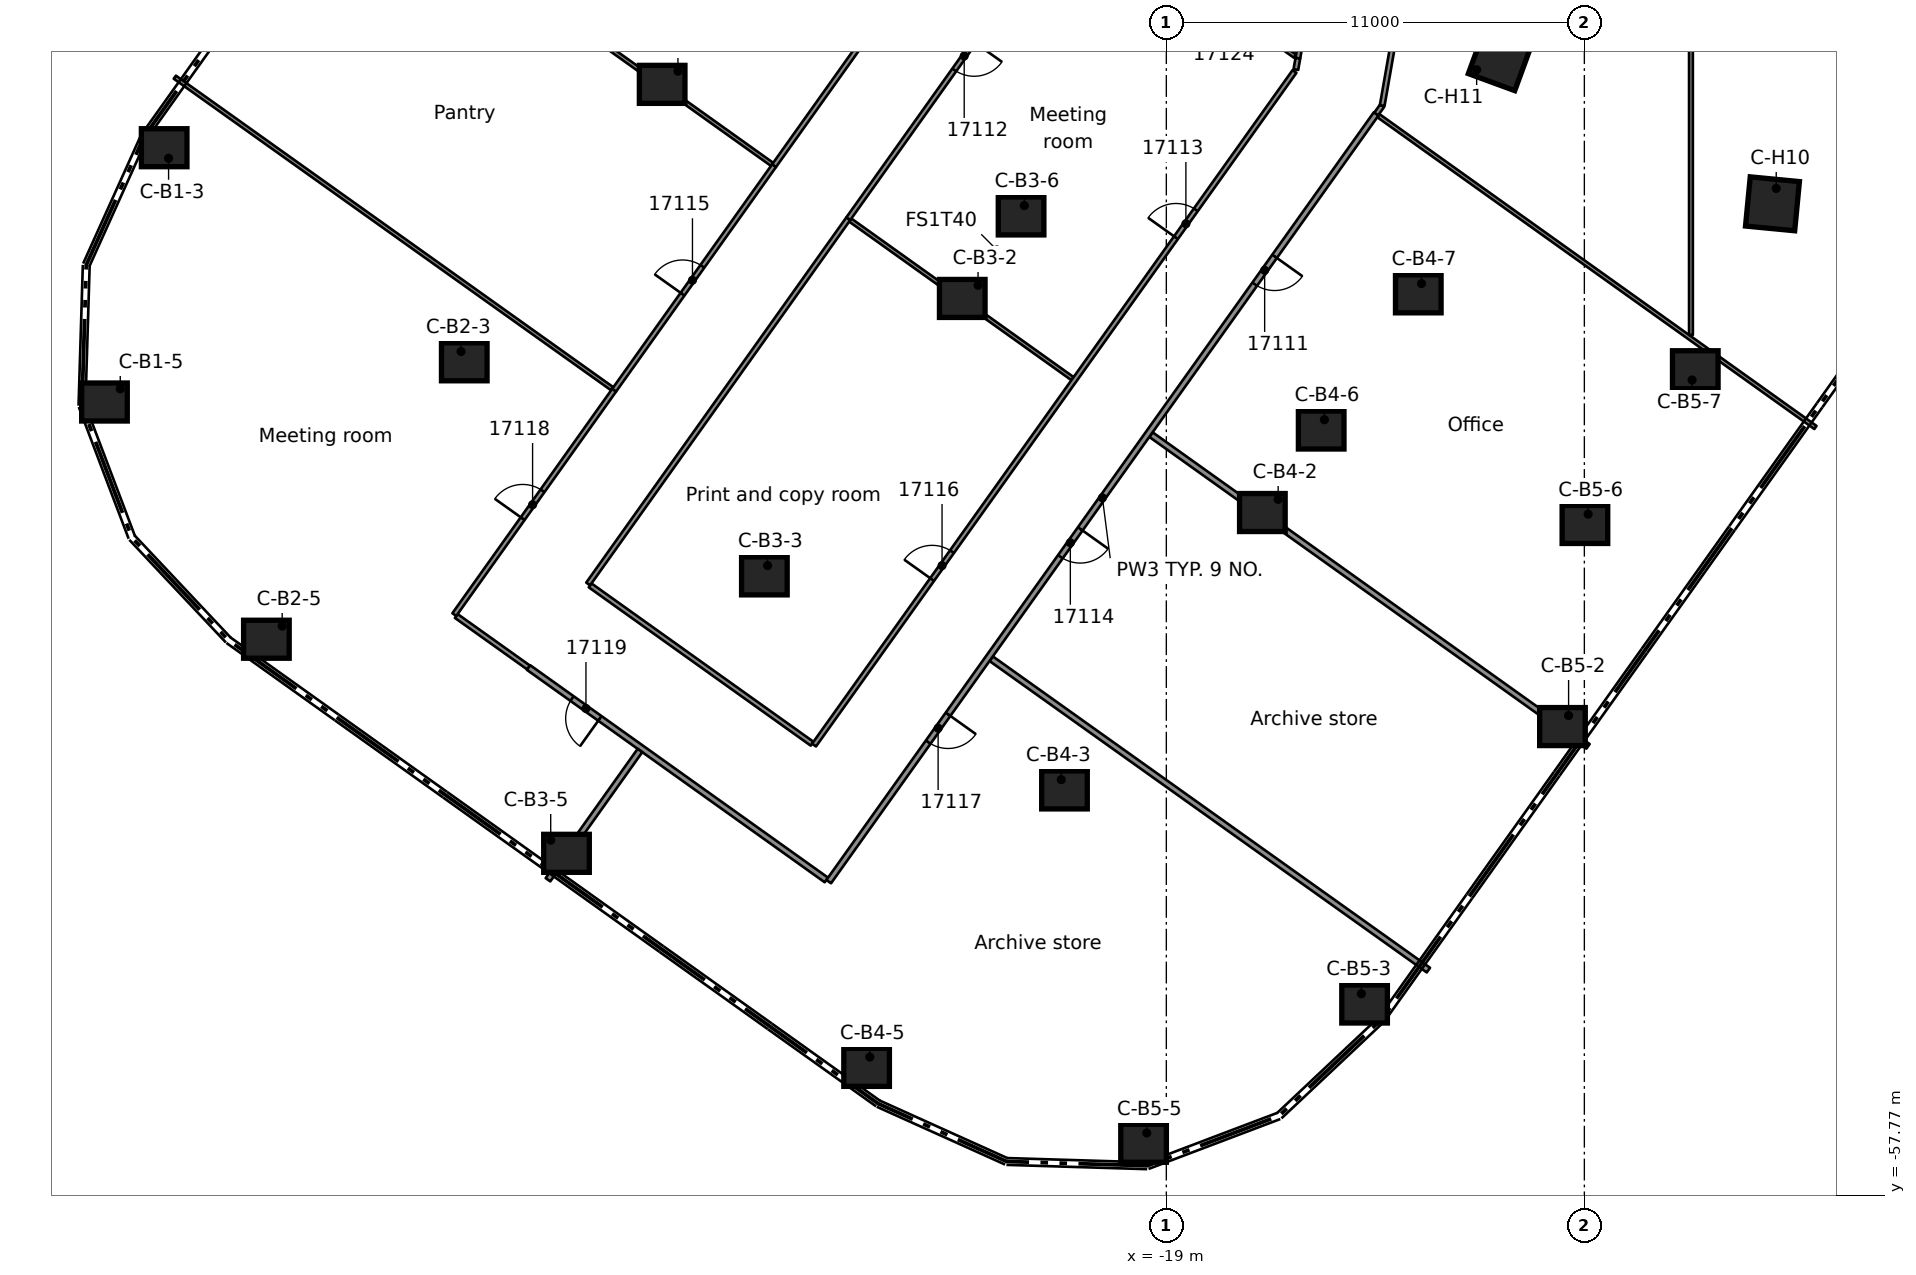
"""IFC4 building model, lengths in metres.
Left out: names, types, materials, properties, quantities, classifications, styles, units other than length and angle.
Written with IfcOpenShell. Run it as: python <this file> out.ifc"""

import sys

from ifc_helpers import new_model, si_unit, direction, frame, frame_2d, origin, origin_2d, place, context, subcontext, project, spatial, rectangle, extrude, element, fill, save


model = new_model("IFC4")
c1 = context("Model", 3, precision=1e-05, world=origin(), true_north=direction((0.0, 1.0)))
c2 = subcontext(c1, "Body", "Model", "MODEL_VIEW")
j1 = project(units=[si_unit("LENGTHUNIT", "METRE"), si_unit("PLANEANGLEUNIT", "RADIAN")], contexts=[c1])
p1 = place(None, origin())
s1 = spatial("IfcSite", under=j1, at=p1, CompositionType="ELEMENT")
p2 = place(p1, origin())
s2 = spatial("IfcBuilding", under=s1, at=p2, CompositionType="ELEMENT")
p3 = place(p2, frame((0.0, 0.0, 84.2)))
s3 = spatial("IfcBuildingStorey", under=s2, at=p3, CompositionType="ELEMENT", Elevation=84.2)
for number, where, z_axis, x_axis in (
    (1, (-45.371, -30.2, 0.0), (0.0, 0.0, 1.0), (1.0, 0.0, 0.0)),
    (2, (-46.942, -36.891, 0.0), (0.0, 0.0, 1.0), (1.0, 0.0, 0.0)),
    (3, (-32.267, -28.533, 0.0), (0.0, 0.0, 1.0), (1.0, 0.0, 0.0)),
    (4, (-37.474, -35.833, 0.0), (0.0, 0.0, 1.0), (1.0, 0.0, 0.0)),
    (5, (-42.681, -43.133, 0.0), (0.0, 0.0, 1.0), (1.0, 0.0, 0.0)),
    (6, (-24.37, -34.166, 0.0), (0.0, 0.0, 1.0), (1.0, 0.0, 0.0)),
    (7, (-29.577, -41.466, 0.0), (0.0, 0.0, 1.0), (1.0, 0.0, 0.0)),
    (8, (-34.784, -48.766, 0.0), (0.0, 0.0, 1.0), (1.0, 0.0, 0.0)),
    (9, (-22.822, -31.995, 0.0), (0.0, 0.0, 1.0), (1.0, 0.0, 0.0)),
    (10, (-16.473, -39.799, 0.0), (0.0, 0.0, 1.0), (1.0, 0.0, 0.0)),
    (11, (-21.68, -47.098, 0.0), (0.0, 0.0, 1.0), (1.0, 0.0, 0.0)),
    (12, (-26.887, -54.398, 0.0), (0.0, 0.0, 1.0), (1.0, 0.0, 0.0)),
    (13, (-14.925, -37.628, 0.0), (0.0, 0.0, 1.0), (1.0, 0.0, 0.0)),
    (14, (-12.37, -34.045, 0.0), (0.0, 0.0, 1.0), (1.0, 0.0, 0.0)),
    (15, (-8.576, -45.431, 0.0), (0.0, 0.0, 1.0), (1.0, 0.0, 0.0)),
    (16, (-13.783, -52.731, 0.0), (0.0, 0.0, 1.0), (1.0, 0.0, 0.0)),
    (17, (-19.599, -56.395, 0.0), (0.0, 0.0, 1.0), (1.0, 0.0, 0.0)),
    (18, (-7.985, -40.113, 0.0), (0.0, 0.0, 1.0), (1.0, 0.0, 0.0)),
    (19, (-5.081, -36.042, 0.0), (0.0, 0.0, 1.0), (1.0, 0.0, 0.0)),
):
    element("IfcColumn", number, at=place(p3, frame(where, z_axis=z_axis, x_axis=x_axis)), inside=s3, PredefinedType="COLUMN", context=c2, shape_type="SweptSolid", body=[
        extrude(rectangle(XDim=1.2, YDim=1.0, at=origin_2d()), origin(), (0.0, 0.0, 1.0), 3.5),
    ])
for number, where, z_axis, x_axis in (
    (20, (-3.05, -31.676, 0.0), (0.0, 0.0, 1.0), (-0.096, -0.995, 0.0)),
    (21, (-10.218, -27.864, 0.0), (0.0, 0.0, 1.0), (-0.344, -0.939, 0.0)),
):
    element("IfcColumn", number, at=place(p3, frame(where, z_axis=z_axis, x_axis=x_axis)), inside=s3, PredefinedType="COLUMN", context=c2, shape_type="SweptSolid", body=[
        extrude(rectangle(XDim=1.3, YDim=1.3, at=origin_2d()), origin(), (0.0, 0.0, 1.0), 3.5),
    ])
p4 = place(p3, frame((-37.685, -42.521, 0.0), z_axis=(0.0, 0.0, 1.0), x_axis=(0.81441767076, -0.580279120385, 0.0)))
e22 = element("IfcWall", 22, at=p4, inside=s3, PredefinedType="PARTITIONING", context=c2, shape_type="SweptSolid", body=[
    extrude(rectangle(XDim=2.337, YDim=0.125, at=frame_2d((1.168, 0.0))), origin(), (0.0, 0.0, 1.0), 3.08),
])
p5 = place(p3, frame((-27.946, -49.467, 0.0), z_axis=(0.0, 0.0, 1.0), x_axis=(-0.814125762823, 0.58068859323, 0.0)))
e23 = element("IfcWall", 23, at=p5, inside=s3, PredefinedType="PARTITIONING", context=c2, shape_type="SweptSolid", body=[
    extrude(rectangle(XDim=9.625, YDim=0.15, at=frame_2d((4.812, 0.0))), origin(), (0.0, 0.0, 1.0), 3.08),
])
p6 = place(p5, frame((7.32, 0.0, 0.0)))
e24 = element("IfcOpeningElement", 24, at=p6, cuts=e23, PredefinedType="OPENING", context=c2, shape_type="SweptSolid", body=[
    extrude(rectangle(XDim=0.9, YDim=2.1, at=frame_2d((0.45, 1.05))), frame((0.0, 0.085, 0.0), z_axis=(0.0, -1.0, 0.0), x_axis=(1.0, 0.0, 0.0)), (0.0, 0.0, 1.0), 0.17),
])
p7 = place(p3, frame((-34.163, -41.715, 0.0), z_axis=(0.0, 0.0, 1.0), x_axis=(0.814121788358, -0.580694165393, 0.0)))
e25 = element("IfcWall", 25, at=p7, inside=s3, PredefinedType="PARTITIONING", context=c2, shape_type="SweptSolid", body=[
    extrude(rectangle(XDim=7.176, YDim=0.125, at=frame_2d((3.588, 0.0))), origin(), (0.0, 0.0, 1.0), 3.08),
])
p8 = place(p3, frame((-45.091, -28.344, 0.0), z_axis=(0.0, 0.0, 1.0), x_axis=(0.814507796702, -0.580152608468, 0.0)))
e26 = element("IfcWall", 26, at=p8, inside=s3, PredefinedType="PARTITIONING", context=c2, shape_type="SweptSolid", body=[
    extrude(rectangle(XDim=14.132, YDim=0.1, at=frame_2d((7.066, 0.0))), origin(), (0.0, 0.0, 1.0), 3.08),
])
p9 = place(p3, frame((-23.608, -43.646, 0.0), z_axis=(0.0, 0.0, 1.0), x_axis=(0.81453511172, -0.580114257517, 0.0)))
e27 = element("IfcWall", 27, at=p9, inside=s3, PredefinedType="PARTITIONING", context=c2, shape_type="SweptSolid", body=[
    extrude(rectangle(XDim=14.123, YDim=0.15, at=frame_2d((7.062, 0.0))), origin(), (0.0, 0.0, 1.0), 3.08),
])
p10 = place(p3, frame((-40.875, -22.433, 0.0), z_axis=(0.0, 0.0, 1.0), x_axis=(0.814073113892, -0.580762399987, 0.0)))
e28 = element("IfcWall", 28, at=p10, inside=s3, PredefinedType="PARTITIONING", context=c2, shape_type="SweptSolid", body=[
    extrude(rectangle(XDim=14.128, YDim=0.1, at=frame_2d((7.064, 0.0))), origin(), (0.0, 0.0, 1.0), 3.08),
])
p11 = place(p3, frame((-27.317, -32.104, 0.0), z_axis=(0.0, 0.0, 1.0), x_axis=(0.814075490276, -0.58075906892, 0.0)))
e29 = element("IfcWall", 29, at=p11, inside=s3, PredefinedType="PARTITIONING", context=c2, shape_type="SweptSolid", body=[
    extrude(rectangle(XDim=7.184, YDim=0.1, at=frame_2d((3.592, 0.0))), origin(), (0.0, 0.0, 1.0), 3.08),
])
p12 = place(p3, frame((-19.403, -37.75, 0.0), z_axis=(0.0, 0.0, 1.0), x_axis=(0.814124535662, -0.580690313707, 0.0)))
e30 = element("IfcWall", 30, at=p12, inside=s3, PredefinedType="PARTITIONING", context=c2, shape_type="SweptSolid", body=[
    extrude(rectangle(XDim=14.125, YDim=0.15, at=frame_2d((7.062, 0.0))), origin(), (0.0, 0.0, 1.0), 3.08),
])
p13 = place(p3, frame((-21.338, -23.709, 0.0), z_axis=(0.0, 0.0, 1.0), x_axis=(0.814120490143, -0.580695985461, 0.0)))
e31 = element("IfcWall", 31, at=p13, inside=s3, PredefinedType="PARTITIONING", context=c2, shape_type="SweptSolid", body=[
    extrude(rectangle(XDim=7.03, YDim=0.1, at=frame_2d((3.515, 0.0))), origin(), (0.0, 0.0, 1.0), 3.08),
])
p14 = place(p3, frame((-13.417, -29.359, 0.0), z_axis=(0.0, 0.0, 1.0), x_axis=(0.814093047319, -0.580734457655, 0.0)))
e32 = element("IfcWall", 32, at=p14, inside=s3, PredefinedType="PARTITIONING", context=c2, shape_type="SweptSolid", body=[
    extrude(rectangle(XDim=14.124, YDim=0.1, at=frame_2d((7.062, 0.0))), origin(), (0.0, 0.0, 1.0), 3.08),
])
p15 = place(p3, frame((-13.478, -29.315, 0.0), z_axis=(0.0, 0.0, 1.0), x_axis=(0.581578261401, 0.813490458374, 0.0)))
e33 = element("IfcWall", 33, at=p15, inside=s3, PredefinedType="PARTITIONING", context=c2, shape_type="SweptSolid", body=[
    extrude(rectangle(XDim=0.271, YDim=0.125, at=frame_2d((0.136, 0.0))), origin(), (0.0, 0.0, 1.0), 3.08),
])
p16 = place(p3, frame((-13.48, -29.312, 0.0), z_axis=(0.0, 0.0, 1.0), x_axis=(-0.580603145907, -0.814186702767, 0.0)))
e34 = element("IfcWall", 34, at=p16, inside=s3, PredefinedType="PARTITIONING", context=c2, shape_type="SweptSolid", body=[
    extrude(rectangle(XDim=24.809, YDim=0.15, at=frame_2d((12.404, 0.0))), origin(), (0.0, 0.0, 1.0), 3.08),
])
p17 = place(p16, frame((4.601, 0.0, 0.0)))
e35 = element("IfcOpeningElement", 35, at=p17, cuts=e34, PredefinedType="OPENING", context=c2, shape_type="SweptSolid", body=[
    extrude(rectangle(XDim=0.9, YDim=2.1, at=frame_2d((0.45, 1.05))), frame((0.0, 0.085, 0.0), z_axis=(0.0, -1.0, 0.0), x_axis=(1.0, 0.0, 0.0)), (0.0, 0.0, 1.0), 0.17),
])
p18 = place(p16, frame((13.408, 0.0, 0.0)))
e36 = element("IfcOpeningElement", 36, at=p18, cuts=e34, PredefinedType="OPENING", context=c2, shape_type="SweptSolid", body=[
    extrude(rectangle(XDim=0.9, YDim=2.1, at=frame_2d((0.45, 1.05))), frame((0.0, 0.085, 0.0), z_axis=(0.0, -1.0, 0.0), x_axis=(1.0, 0.0, 0.0)), (0.0, 0.0, 1.0), 0.17),
])
p19 = place(p16, frame((19.4, 0.0, 0.0)))
e37 = element("IfcOpeningElement", 37, at=p19, cuts=e34, PredefinedType="OPENING", context=c2, shape_type="SweptSolid", body=[
    extrude(rectangle(XDim=0.9, YDim=2.1, at=frame_2d((0.45, 1.05))), frame((0.0, 0.085, 0.0), z_axis=(0.0, -1.0, 0.0), x_axis=(1.0, 0.0, 0.0)), (0.0, 0.0, 1.0), 0.17),
])
p20 = place(p3, frame((-28.27, -45.918, 0.0), z_axis=(0.0, 0.0, 1.0), x_axis=(0.580725722128, 0.814099278749, 0.0)))
e38 = element("IfcWall", 38, at=p20, inside=s3, PredefinedType="PARTITIONING", context=c2, shape_type="SweptSolid", body=[
    extrude(rectangle(XDim=21.771, YDim=0.125, at=frame_2d((10.886, 0.0))), origin(), (0.0, 0.0, 1.0), 3.08),
])
p21 = place(p20, frame((16.399, 0.0, 0.0)))
e39 = element("IfcOpeningElement", 39, at=p21, cuts=e38, PredefinedType="OPENING", context=c2, shape_type="SweptSolid", body=[
    extrude(rectangle(XDim=0.9, YDim=2.1, at=frame_2d((0.45, 1.05))), frame((0.0, 0.073, 0.0), z_axis=(0.0, -1.0, 0.0), x_axis=(1.0, 0.0, 0.0)), (0.0, 0.0, 1.0), 0.145),
])
p22 = place(p20, frame((5.35, 0.0, 0.0)))
e40 = element("IfcOpeningElement", 40, at=p22, cuts=e38, PredefinedType="OPENING", context=c2, shape_type="SweptSolid", body=[
    extrude(rectangle(XDim=0.9, YDim=2.1, at=frame_2d((0.45, 1.05))), frame((0.0, 0.073, 0.0), z_axis=(0.0, -1.0, 0.0), x_axis=(1.0, 0.0, 0.0)), (0.0, 0.0, 1.0), 0.145),
])
p23 = place(p3, frame((-35.272, -49.462, 0.0), z_axis=(0.0, 0.0, 1.0), x_axis=(0.579920767456, 0.814672881268, 0.0)))
e41 = element("IfcWall", 41, at=p23, inside=s3, PredefinedType="PARTITIONING", context=c2, shape_type="SweptSolid", body=[
    extrude(rectangle(XDim=4.175, YDim=0.15, at=frame_2d((2.087, 0.0))), origin(), (0.0, 0.0, 1.0), 3.08),
])
p24 = place(p3, frame((-34.214, -41.679, 0.0), z_axis=(0.0, 0.0, 1.0), x_axis=(0.580188672361, 0.81448210813, 0.0)))
e42 = element("IfcWall", 42, at=p24, inside=s3, PredefinedType="PARTITIONING", context=c2, shape_type="SweptSolid", body=[
    extrude(rectangle(XDim=11.8, YDim=0.125, at=frame_2d((5.9, 0.0))), origin(), (0.0, 0.0, 1.0), 3.08),
])
p25 = place(p3, frame((-19.504, -21.026, 0.0), z_axis=(0.0, 0.0, 1.0), x_axis=(-0.580099628217, -0.814545530552, 0.0)))
e43 = element("IfcWall", 43, at=p25, inside=s3, PredefinedType="PARTITIONING", context=c2, shape_type="SweptSolid", body=[
    extrude(rectangle(XDim=13.556, YDim=0.125, at=frame_2d((6.778, 0.0))), origin(), (0.0, 0.0, 1.0), 3.08),
])
p26 = place(p25, frame((7.85, 0.0, 0.0)))
e44 = element("IfcOpeningElement", 44, at=p26, cuts=e43, PredefinedType="OPENING", context=c2, shape_type="SweptSolid", body=[
    extrude(rectangle(XDim=0.9, YDim=2.1, at=frame_2d((0.45, 1.05))), frame((0.0, 0.073, 0.0), z_axis=(0.0, -1.0, 0.0), x_axis=(1.0, 0.0, 0.0)), (0.0, 0.0, 1.0), 0.145),
])
p27 = place(p3, frame((-37.736, -42.485, 0.0), z_axis=(0.0, 0.0, 1.0), x_axis=(0.580183503548, 0.814485790061, 0.0)))
e45 = element("IfcWall", 45, at=p27, inside=s3, PredefinedType="PARTITIONING", context=c2, shape_type="SweptSolid", body=[
    extrude(rectangle(XDim=7.251, YDim=0.125, at=frame_2d((3.625, 0.0))), origin(), (0.0, 0.0, 1.0), 3.08),
])
p28 = place(p27, frame((3.1, 0.0, 0.0)))
e46 = element("IfcOpeningElement", 46, at=p28, cuts=e45, PredefinedType="OPENING", context=c2, shape_type="SweptSolid", body=[
    extrude(rectangle(XDim=0.9, YDim=2.1, at=frame_2d((0.45, 1.05))), frame((0.0, 0.073, 0.0), z_axis=(0.0, -1.0, 0.0), x_axis=(1.0, 0.0, 0.0)), (0.0, 0.0, 1.0), 0.145),
])
p29 = place(p3, frame((-29.323, -30.674, 0.0), z_axis=(0.0, 0.0, 1.0), x_axis=(0.580180127153, 0.814488195161, 0.0)))
e47 = element("IfcWall", 47, at=p29, inside=s3, PredefinedType="PARTITIONING", context=c2, shape_type="SweptSolid", body=[
    extrude(rectangle(XDim=10.307, YDim=0.125, at=frame_2d((5.154, 0.0))), origin(), (0.0, 0.0, 1.0), 3.08),
])
p30 = place(p29, frame((4.6, 0.0, 0.0)))
e48 = element("IfcOpeningElement", 48, at=p30, cuts=e47, PredefinedType="OPENING", context=c2, shape_type="SweptSolid", body=[
    extrude(rectangle(XDim=0.9, YDim=2.1, at=frame_2d((0.45, 1.05))), frame((0.0, 0.073, 0.0), z_axis=(0.0, -1.0, 0.0), x_axis=(1.0, 0.0, 0.0)), (0.0, 0.0, 1.0), 0.145),
])
p31 = place(p29, frame((8.85, 0.0, 0.0)))
e49 = element("IfcOpeningElement", 49, at=p31, cuts=e47, PredefinedType="OPENING", context=c2, shape_type="SweptSolid", body=[
    extrude(rectangle(XDim=0.9, YDim=2.1, at=frame_2d((0.45, 1.05))), frame((0.0, 0.073, 0.0), z_axis=(0.0, -1.0, 0.0), x_axis=(1.0, 0.0, 0.0)), (0.0, 0.0, 1.0), 0.145),
])
p32 = place(p3, frame((-33.529, -36.579, 0.0), z_axis=(0.0, 0.0, 1.0), x_axis=(0.580157797449, 0.814504100702, 0.0)))
e50 = element("IfcWall", 50, at=p32, inside=s3, PredefinedType="PARTITIONING", context=c2, shape_type="SweptSolid", body=[
    extrude(rectangle(XDim=7.25, YDim=0.125, at=frame_2d((3.625, 0.0))), origin(), (0.0, 0.0, 1.0), 3.08),
])
p33 = place(p32, frame((3.1, 0.0, 0.0)))
e51 = element("IfcOpeningElement", 51, at=p33, cuts=e50, PredefinedType="OPENING", context=c2, shape_type="SweptSolid", body=[
    extrude(rectangle(XDim=0.9, YDim=2.1, at=frame_2d((0.45, 1.05))), frame((0.0, 0.073, 0.0), z_axis=(0.0, -1.0, 0.0), x_axis=(1.0, 0.0, 0.0)), (0.0, 0.0, 1.0), 0.145),
])
p34 = place(p3, frame((-12.341, -23.507, 0.0), z_axis=(0.0, 0.0, 1.0), x_axis=(-0.172630951449, -0.984986575849, 0.0)))
e52 = element("IfcWall", 52, at=p34, inside=s3, PredefinedType="PARTITIONING", context=c2, shape_type="SweptSolid", body=[
    extrude(rectangle(XDim=5.671, YDim=0.125, at=frame_2d((2.835, 0.0))), origin(), (0.0, 0.0, 1.0), 3.08),
])
p35 = place(p34, frame((2.35, 0.0, 0.0)))
e53 = element("IfcOpeningElement", 53, at=p35, cuts=e52, PredefinedType="OPENING", context=c2, shape_type="SweptSolid", body=[
    extrude(rectangle(XDim=0.9, YDim=2.1, at=frame_2d((0.45, 1.05))), frame((0.0, 0.073, 0.0), z_axis=(0.0, -1.0, 0.0), x_axis=(1.0, 0.0, 0.0)), (0.0, 0.0, 1.0), 0.145),
])
p36 = place(p3, frame((-15.539, -27.845, 0.0), z_axis=(0.0, 0.0, 1.0), x_axis=(0.172636295387, 0.984985639243, 0.0)))
e54 = element("IfcWall", 54, at=p36, inside=s3, PredefinedType="PARTITIONING", context=c2, shape_type="SweptSolid", body=[
    extrude(rectangle(XDim=4.049, YDim=0.125, at=frame_2d((2.024, 0.0))), origin(), (0.0, 0.0, 1.0), 3.08),
])
p37 = place(p36, frame((1.6, 0.0, 0.0)))
e55 = element("IfcOpeningElement", 55, at=p37, cuts=e54, PredefinedType="OPENING", context=c2, shape_type="SweptSolid", body=[
    extrude(rectangle(XDim=0.9, YDim=2.1, at=frame_2d((0.45, 1.05))), frame((0.0, 0.073, 0.0), z_axis=(0.0, -1.0, 0.0), x_axis=(1.0, 0.0, 0.0)), (0.0, 0.0, 1.0), 0.145),
])
p38 = place(p3, frame((-15.591, -28.143, 0.0), z_axis=(0.0, 0.0, 1.0), x_axis=(0.171851888702, 0.985122798614, 0.0)))
e56 = element("IfcWall", 56, at=p38, inside=s3, PredefinedType="PARTITIONING", context=c2, shape_type="SweptSolid", body=[
    extrude(rectangle(XDim=0.302, YDim=0.125, at=frame_2d((0.151, 0.0))), origin(), (0.0, 0.0, 1.0), 3.08),
])
p39 = place(p3, frame((-5.195, -35.127, 0.0), z_axis=(0.0, 0.0, 1.0), x_axis=(0.0, 1.0, 0.0)))
e57 = element("IfcWall", 57, at=p39, inside=s3, PredefinedType="PARTITIONING", context=c2, shape_type="SweptSolid", body=[
    extrude(rectangle(XDim=20.664, YDim=0.1, at=frame_2d((10.332, 0.0))), origin(), (0.0, 0.0, 1.0), 3.08),
])
p40 = place(p17, origin())
e58 = element("IfcDoor", 58, at=p40, inside=s3, OperationType="SINGLE_SWING_LEFT", PredefinedType="DOOR", context=c2, shape_type="SweptSolid", body=[
    extrude(rectangle(XDim=0.9, YDim=2.1, at=frame_2d((0.45, 1.05))), frame((0.0, 0.025, 0.0), z_axis=(0.0, -1.0, 0.0), x_axis=(1.0, 0.0, 0.0)), (0.0, 0.0, 1.0), 0.05),
])
fill(e35, e58)
p41 = place(p26, origin())
e59 = element("IfcDoor", 59, at=p41, inside=s3, OperationType="SINGLE_SWING_RIGHT", PredefinedType="DOOR", context=c2, shape_type="SweptSolid", body=[
    extrude(rectangle(XDim=0.9, YDim=2.1, at=frame_2d((0.45, 1.05))), frame((0.0, 0.025, 0.0), z_axis=(0.0, -1.0, 0.0), x_axis=(1.0, 0.0, 0.0)), (0.0, 0.0, 1.0), 0.05),
])
fill(e44, e59)
p42 = place(p21, origin())
e60 = element("IfcDoor", 60, at=p42, inside=s3, OperationType="SINGLE_SWING_RIGHT", PredefinedType="DOOR", context=c2, shape_type="SweptSolid", body=[
    extrude(rectangle(XDim=0.9, YDim=2.1, at=frame_2d((0.45, 1.05))), frame((0.0, 0.025, 0.0), z_axis=(0.0, -1.0, 0.0), x_axis=(1.0, 0.0, 0.0)), (0.0, 0.0, 1.0), 0.05),
])
fill(e39, e60)
p43 = place(p18, origin())
e61 = element("IfcDoor", 61, at=p43, inside=s3, OperationType="SINGLE_SWING_RIGHT", PredefinedType="DOOR", context=c2, shape_type="SweptSolid", body=[
    extrude(rectangle(XDim=0.9, YDim=2.1, at=frame_2d((0.45, 1.05))), frame((0.0, 0.025, 0.0), z_axis=(0.0, -1.0, 0.0), x_axis=(1.0, 0.0, 0.0)), (0.0, 0.0, 1.0), 0.05),
])
fill(e36, e61)
p44 = place(p33, origin())
e62 = element("IfcDoor", 62, at=p44, inside=s3, OperationType="SINGLE_SWING_LEFT", PredefinedType="DOOR", context=c2, shape_type="SweptSolid", body=[
    extrude(rectangle(XDim=0.9, YDim=2.1, at=frame_2d((0.45, 1.05))), frame((0.0, 0.025, 0.0), z_axis=(0.0, -1.0, 0.0), x_axis=(1.0, 0.0, 0.0)), (0.0, 0.0, 1.0), 0.05),
])
fill(e51, e62)
p45 = place(p22, origin())
e63 = element("IfcDoor", 63, at=p45, inside=s3, OperationType="SINGLE_SWING_LEFT", PredefinedType="DOOR", context=c2, shape_type="SweptSolid", body=[
    extrude(rectangle(XDim=0.9, YDim=2.1, at=frame_2d((0.45, 1.05))), frame((0.0, 0.025, 0.0), z_axis=(0.0, -1.0, 0.0), x_axis=(1.0, 0.0, 0.0)), (0.0, 0.0, 1.0), 0.05),
])
fill(e40, e63)
p46 = place(p19, origin())
e64 = element("IfcDoor", 64, at=p46, inside=s3, OperationType="SINGLE_SWING_RIGHT", PredefinedType="DOOR", context=c2, shape_type="SweptSolid", body=[
    extrude(rectangle(XDim=0.9, YDim=2.1, at=frame_2d((0.45, 1.05))), frame((0.0, 0.025, 0.0), z_axis=(0.0, -1.0, 0.0), x_axis=(1.0, 0.0, 0.0)), (0.0, 0.0, 1.0), 0.05),
])
fill(e37, e64)
p47 = place(p28, origin())
e65 = element("IfcDoor", 65, at=p47, inside=s3, OperationType="SINGLE_SWING_LEFT", PredefinedType="DOOR", context=c2, shape_type="SweptSolid", body=[
    extrude(rectangle(XDim=0.9, YDim=2.1, at=frame_2d((0.45, 1.05))), frame((0.0, 0.025, 0.0), z_axis=(0.0, -1.0, 0.0), x_axis=(1.0, 0.0, 0.0)), (0.0, 0.0, 1.0), 0.05),
])
fill(e46, e65)
p48 = place(p6, origin())
e66 = element("IfcDoor", 66, at=p48, inside=s3, OperationType="SINGLE_SWING_RIGHT", PredefinedType="DOOR", context=c2, shape_type="SweptSolid", body=[
    extrude(rectangle(XDim=0.9, YDim=2.1, at=frame_2d((0.45, 1.05))), frame((0.0, 0.025, 0.0), z_axis=(0.0, -1.0, 0.0), x_axis=(1.0, 0.0, 0.0)), (0.0, 0.0, 1.0), 0.05),
])
fill(e24, e66)
save(model, sys.argv[1])
